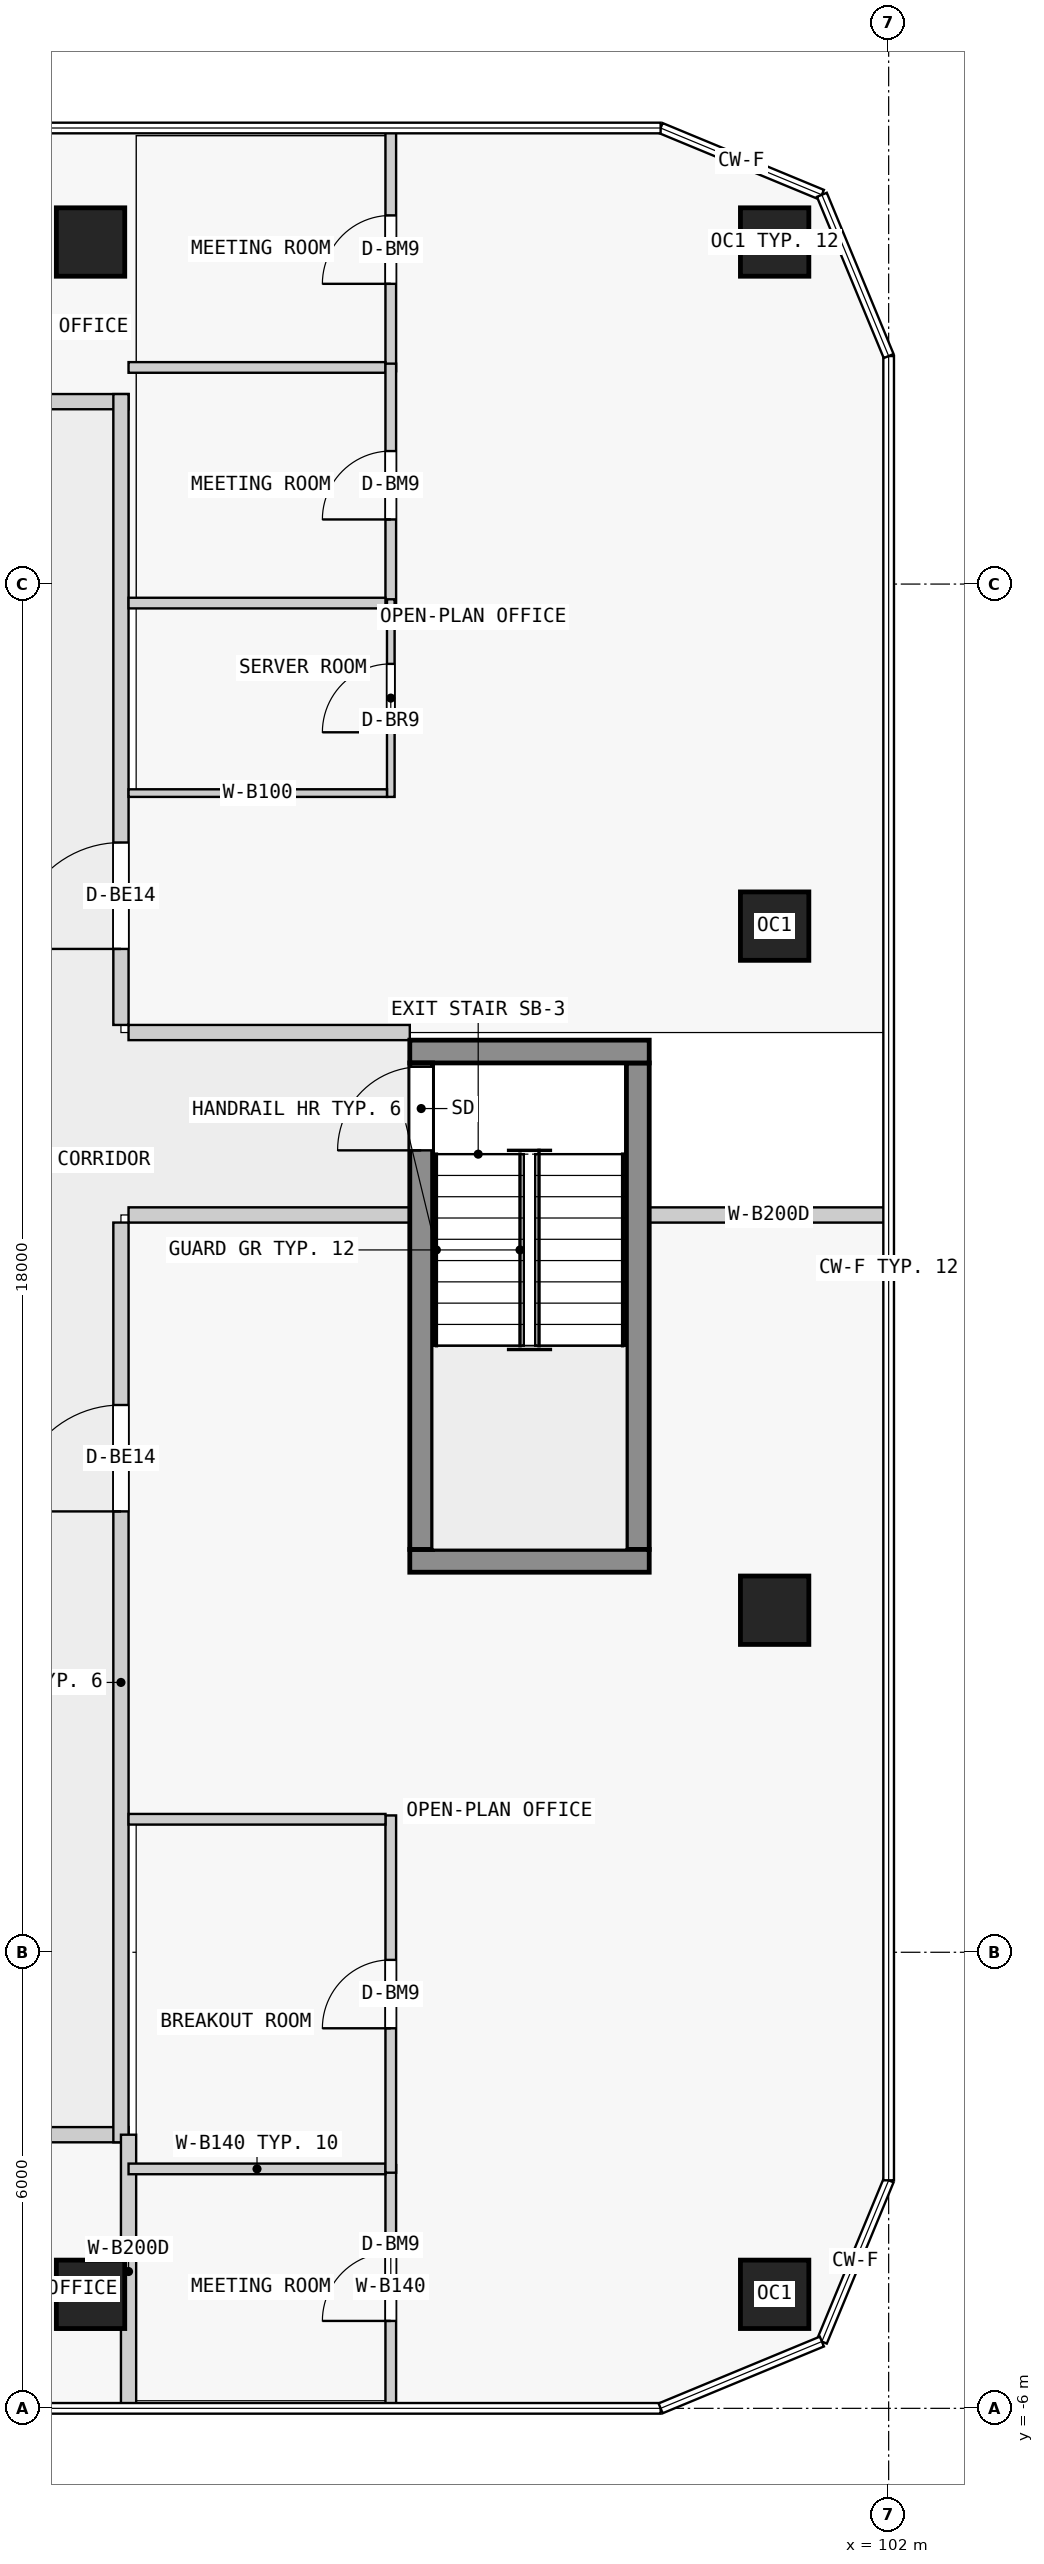
"""IFC4 building model, lengths in metres.
Left out: names, types, materials, properties, quantities, classifications, styles, units other than length and angle.
Written with IfcOpenShell. Run it as: python <this file> out.ifc"""

import sys

from ifc_helpers import new_model, si_unit, direction, frame, frame_2d, origin, origin_2d, place, context, subcontext, project, spatial, rectangle, extrude, element, fill, save


model = new_model("IFC4")
c1 = context("Model", 3, precision=1e-05, world=origin(), true_north=direction((0.0, 1.0)))
c2 = subcontext(c1, "Body", "Model", "MODEL_VIEW")
j1 = project(units=[si_unit("LENGTHUNIT", "METRE"), si_unit("PLANEANGLEUNIT", "RADIAN")], contexts=[c1])
p1 = place(None, origin())
s1 = spatial("IfcSite", under=j1, at=p1, CompositionType="ELEMENT")
p2 = place(p1, origin())
s2 = spatial("IfcBuilding", under=s1, at=p2, CompositionType="ELEMENT")
p3 = place(p2, frame((0.0, 0.0, 88.8)))
s3 = spatial("IfcBuildingStorey", under=s2, at=p3, CompositionType="ELEMENT", Elevation=88.8)
for number, where, z_axis, x_axis in (
    (1, (91.5, -4.5, 0.0), (0.0, 0.0, 1.0), (1.0, 0.0, 0.0)),
    (2, (100.5, -4.5, 0.0), (0.0, 0.0, 1.0), (1.0, 0.0, 0.0)),
    (3, (100.5, 4.5, 0.0), (0.0, 0.0, 1.0), (1.0, 0.0, 0.0)),
    (4, (100.5, 13.5, 0.0), (0.0, 0.0, 1.0), (1.0, 0.0, 0.0)),
    (5, (100.5, 22.5, 0.0), (0.0, 0.0, 1.0), (1.0, 0.0, 0.0)),
    (6, (91.5, 22.5, 0.0), (0.0, 0.0, 1.0), (1.0, 0.0, 0.0)),
):
    element("IfcColumn", number, at=place(p3, frame(where, z_axis=z_axis, x_axis=x_axis)), inside=s3, PredefinedType="COLUMN", context=c2, shape_type="SweptSolid", body=[
        extrude(rectangle(XDim=0.9, YDim=0.9, at=origin_2d()), origin(), (0.0, 0.0, 1.0), 3.5),
    ])
p4 = place(p3, frame((95.85, 5.3, 0.0), z_axis=(0.0, 0.0, 1.0), x_axis=(0.0, 1.0, 0.0)))
e7 = element("IfcWall", 7, at=p4, inside=s3, PredefinedType="SHEAR", context=c2, shape_type="SweptSolid", body=[
    extrude(rectangle(XDim=6.4, YDim=0.3, at=frame_2d((3.2, 0.0))), origin(), (0.0, 0.0, 1.0), 3.25),
])
p5 = place(p4, frame((5.25, 0.0, 0.0)))
e8 = element("IfcOpeningElement", 8, at=p5, cuts=e7, PredefinedType="OPENING", context=c2, shape_type="SweptSolid", body=[
    extrude(rectangle(XDim=1.1, YDim=2.1, at=frame_2d((0.55, 1.05))), frame((0.0, 0.16, 0.0), z_axis=(0.0, -1.0, 0.0), x_axis=(1.0, 0.0, 0.0)), (0.0, 0.0, 1.0), 0.32),
])
p6 = place(p3, frame((98.7, 5.3, 0.0), z_axis=(0.0, 0.0, 1.0), x_axis=(0.0, 1.0, 0.0)))
e9 = element("IfcWall", 9, at=p6, inside=s3, PredefinedType="SHEAR", context=c2, shape_type="SweptSolid", body=[
    extrude(rectangle(XDim=6.4, YDim=0.3, at=frame_2d((3.2, 0.0))), origin(), (0.0, 0.0, 1.0), 3.25),
])
for number, where, z_axis, x_axis in (
    (10, (95.7, 5.15, 0.0), (0.0, 0.0, 1.0), (1.0, 0.0, 0.0)),
    (11, (95.7, 11.85, 0.0), (0.0, 0.0, 1.0), (1.0, 0.0, 0.0)),
):
    element("IfcWall", number, at=place(p3, frame(where, z_axis=z_axis, x_axis=x_axis)), inside=s3, PredefinedType="SHEAR", context=c2, shape_type="SweptSolid", body=[
        extrude(rectangle(XDim=3.15, YDim=0.3, at=frame_2d((1.575, 0.0))), origin(), (0.0, 0.0, 1.0), 3.25),
    ])
p7 = place(p3, frame((72.0, -2.4, 0.0), z_axis=(0.0, 0.0, 1.0), x_axis=(1.0, 0.0, 0.0)))
e12 = element("IfcWall", 12, at=p7, inside=s3, PredefinedType="PARTITIONING", context=c2, shape_type="SweptSolid", body=[
    extrude(rectangle(XDim=20.0, YDim=0.2, at=frame_2d((10.0, 0.0))), origin(), (0.0, 0.0, 1.0), 3.25),
])
p8 = place(p7, frame((11.5, 0.0, 0.0)))
e13 = element("IfcOpeningElement", 13, at=p8, cuts=e12, PredefinedType="OPENING", context=c2, shape_type="SweptSolid", body=[
    extrude(rectangle(XDim=1.0, YDim=2.4, at=frame_2d((0.5, 1.2))), frame((0.0, 0.11, 0.0), z_axis=(0.0, -1.0, 0.0), x_axis=(1.0, 0.0, 0.0)), (0.0, 0.0, 1.0), 0.22),
])
p9 = place(p3, frame((72.0, 20.4, 0.0), z_axis=(0.0, 0.0, 1.0), x_axis=(1.0, 0.0, 0.0)))
e14 = element("IfcWall", 14, at=p9, inside=s3, PredefinedType="PARTITIONING", context=c2, shape_type="SweptSolid", body=[
    extrude(rectangle(XDim=20.0, YDim=0.2, at=frame_2d((10.0, 0.0))), origin(), (0.0, 0.0, 1.0), 3.25),
])
p10 = place(p3, frame((91.9, -2.5, 0.0), z_axis=(0.0, 0.0, 1.0), x_axis=(0.0, 1.0, 0.0)))
e15 = element("IfcWall", 15, at=p10, inside=s3, PredefinedType="PARTITIONING", context=c2, shape_type="SweptSolid", body=[
    extrude(rectangle(XDim=12.1, YDim=0.2, at=frame_2d((6.05, 0.0))), origin(), (0.0, 0.0, 1.0), 3.25),
])
p11 = place(p10, frame((8.3, 0.0, 0.0)))
e16 = element("IfcOpeningElement", 16, at=p11, cuts=e15, PredefinedType="OPENING", context=c2, shape_type="SweptSolid", body=[
    extrude(rectangle(XDim=1.4, YDim=2.4, at=frame_2d((0.7, 1.2))), frame((0.0, 0.11, 0.0), z_axis=(0.0, -1.0, 0.0), x_axis=(1.0, 0.0, 0.0)), (0.0, 0.0, 1.0), 0.22),
])
p12 = place(p3, frame((91.9, 12.2, 0.0), z_axis=(0.0, 0.0, 1.0), x_axis=(0.0, 1.0, 0.0)))
e17 = element("IfcWall", 17, at=p12, inside=s3, PredefinedType="PARTITIONING", context=c2, shape_type="SweptSolid", body=[
    extrude(rectangle(XDim=8.3, YDim=0.2, at=frame_2d((4.15, 0.0))), origin(), (0.0, 0.0, 1.0), 3.25),
])
p13 = place(p12, frame((1.0, 0.0, 0.0)))
e18 = element("IfcOpeningElement", 18, at=p13, cuts=e17, PredefinedType="OPENING", context=c2, shape_type="SweptSolid", body=[
    extrude(rectangle(XDim=1.4, YDim=2.4, at=frame_2d((0.7, 1.2))), frame((0.0, 0.11, 0.0), z_axis=(0.0, -1.0, 0.0), x_axis=(1.0, 0.0, 0.0)), (0.0, 0.0, 1.0), 0.22),
])
for number, where, z_axis, x_axis in (
    (19, (92.0, 9.7, 0.0), (0.0, 0.0, 1.0), (1.0, 0.0, 0.0)),
    (20, (92.0, 12.1, 0.0), (0.0, 0.0, 1.0), (1.0, 0.0, 0.0)),
):
    element("IfcWall", number, at=place(p3, frame(where, z_axis=z_axis, x_axis=x_axis)), inside=s3, PredefinedType="PARTITIONING", context=c2, shape_type="SweptSolid", body=[
        extrude(rectangle(XDim=3.7, YDim=0.2, at=frame_2d((1.85, 0.0))), origin(), (0.0, 0.0, 1.0), 3.25),
    ])
p14 = place(p3, frame((98.85, 9.7, 0.0), z_axis=(0.0, 0.0, 1.0), x_axis=(1.0, 0.0, 0.0)))
e21 = element("IfcWall", 21, at=p14, inside=s3, PredefinedType="PARTITIONING", context=c2, shape_type="SweptSolid", body=[
    extrude(rectangle(XDim=3.15, YDim=0.2, at=frame_2d((1.575, 0.0))), origin(), (0.0, 0.0, 1.0), 3.25),
])
p15 = place(p3, frame((92.0, -6.0, 0.0), z_axis=(0.0, 0.0, 1.0), x_axis=(0.0, 1.0, 0.0)))
e22 = element("IfcWall", 22, at=p15, inside=s3, PredefinedType="PARTITIONING", context=c2, shape_type="SweptSolid", body=[
    extrude(rectangle(XDim=3.6, YDim=0.2, at=frame_2d((1.8, 0.0))), origin(), (0.0, 0.0, 1.0), 3.25),
])
p16 = place(p3, frame((95.45, -6.0, 0.0), z_axis=(0.0, 0.0, 1.0), x_axis=(0.0, 1.0, 0.0)))
e23 = element("IfcWall", 23, at=p16, inside=s3, PredefinedType="PARTITIONING", context=c2, shape_type="SweptSolid", body=[
    extrude(rectangle(XDim=3.2, YDim=0.14, at=frame_2d((1.6, 0.0))), origin(), (0.0, 0.0, 1.0), 3.25),
])
p17 = place(p16, frame((1.15, 0.0, 0.0)))
e24 = element("IfcOpeningElement", 24, at=p17, cuts=e23, PredefinedType="OPENING", context=c2, shape_type="SweptSolid", body=[
    extrude(rectangle(XDim=0.9, YDim=2.4, at=frame_2d((0.45, 1.2))), frame((0.0, 0.08, 0.0), z_axis=(0.0, -1.0, 0.0), x_axis=(1.0, 0.0, 0.0)), (0.0, 0.0, 1.0), 0.16),
])
p18 = place(p3, frame((92.0, -2.85, 0.0), z_axis=(0.0, 0.0, 1.0), x_axis=(1.0, 0.0, 0.0)))
e25 = element("IfcWall", 25, at=p18, inside=s3, PredefinedType="PARTITIONING", context=c2, shape_type="SweptSolid", body=[
    extrude(rectangle(XDim=3.38, YDim=0.14, at=frame_2d((1.69, 0.0))), origin(), (0.0, 0.0, 1.0), 3.25),
])
p19 = place(p3, frame((95.45, -2.9, 0.0), z_axis=(0.0, 0.0, 1.0), x_axis=(0.0, 1.0, 0.0)))
e26 = element("IfcWall", 26, at=p19, inside=s3, PredefinedType="PARTITIONING", context=c2, shape_type="SweptSolid", body=[
    extrude(rectangle(XDim=4.7, YDim=0.14, at=frame_2d((2.35, 0.0))), origin(), (0.0, 0.0, 1.0), 3.25),
])
p20 = place(p19, frame((1.9, 0.0, 0.0)))
e27 = element("IfcOpeningElement", 27, at=p20, cuts=e26, PredefinedType="OPENING", context=c2, shape_type="SweptSolid", body=[
    extrude(rectangle(XDim=0.9, YDim=2.4, at=frame_2d((0.45, 1.2))), frame((0.0, 0.08, 0.0), z_axis=(0.0, -1.0, 0.0), x_axis=(1.0, 0.0, 0.0)), (0.0, 0.0, 1.0), 0.16),
])
p21 = place(p3, frame((92.0, 1.75, 0.0), z_axis=(0.0, 0.0, 1.0), x_axis=(1.0, 0.0, 0.0)))
e28 = element("IfcWall", 28, at=p21, inside=s3, PredefinedType="PARTITIONING", context=c2, shape_type="SweptSolid", body=[
    extrude(rectangle(XDim=3.38, YDim=0.14, at=frame_2d((1.69, 0.0))), origin(), (0.0, 0.0, 1.0), 3.25),
])
p22 = place(p3, frame((95.45, 20.8, 0.0), z_axis=(0.0, 0.0, 1.0), x_axis=(0.0, 1.0, 0.0)))
e29 = element("IfcWall", 29, at=p22, inside=s3, PredefinedType="PARTITIONING", context=c2, shape_type="SweptSolid", body=[
    extrude(rectangle(XDim=3.2, YDim=0.14, at=frame_2d((1.6, 0.0))), origin(), (0.0, 0.0, 1.0), 3.25),
])
p23 = place(p22, frame((1.15, 0.0, 0.0)))
e30 = element("IfcOpeningElement", 30, at=p23, cuts=e29, PredefinedType="OPENING", context=c2, shape_type="SweptSolid", body=[
    extrude(rectangle(XDim=0.9, YDim=2.4, at=frame_2d((0.45, 1.2))), frame((0.0, 0.08, 0.0), z_axis=(0.0, -1.0, 0.0), x_axis=(1.0, 0.0, 0.0)), (0.0, 0.0, 1.0), 0.16),
])
p24 = place(p3, frame((92.0, 20.85, 0.0), z_axis=(0.0, 0.0, 1.0), x_axis=(1.0, 0.0, 0.0)))
e31 = element("IfcWall", 31, at=p24, inside=s3, PredefinedType="PARTITIONING", context=c2, shape_type="SweptSolid", body=[
    extrude(rectangle(XDim=3.38, YDim=0.14, at=frame_2d((1.69, 0.0))), origin(), (0.0, 0.0, 1.0), 3.25),
])
p25 = place(p3, frame((95.45, 17.7, 0.0), z_axis=(0.0, 0.0, 1.0), x_axis=(0.0, 1.0, 0.0)))
e32 = element("IfcWall", 32, at=p25, inside=s3, PredefinedType="PARTITIONING", context=c2, shape_type="SweptSolid", body=[
    extrude(rectangle(XDim=3.2, YDim=0.14, at=frame_2d((1.6, 0.0))), origin(), (0.0, 0.0, 1.0), 3.25),
])
p26 = place(p25, frame((1.15, 0.0, 0.0)))
e33 = element("IfcOpeningElement", 33, at=p26, cuts=e32, PredefinedType="OPENING", context=c2, shape_type="SweptSolid", body=[
    extrude(rectangle(XDim=0.9, YDim=2.4, at=frame_2d((0.45, 1.2))), frame((0.0, 0.08, 0.0), z_axis=(0.0, -1.0, 0.0), x_axis=(1.0, 0.0, 0.0)), (0.0, 0.0, 1.0), 0.16),
])
p27 = place(p3, frame((92.0, 17.75, 0.0), z_axis=(0.0, 0.0, 1.0), x_axis=(1.0, 0.0, 0.0)))
e34 = element("IfcWall", 34, at=p27, inside=s3, PredefinedType="PARTITIONING", context=c2, shape_type="SweptSolid", body=[
    extrude(rectangle(XDim=3.38, YDim=0.14, at=frame_2d((1.69, 0.0))), origin(), (0.0, 0.0, 1.0), 3.25),
])
p28 = place(p3, frame((95.45, 15.2, 0.0), z_axis=(0.0, 0.0, 1.0), x_axis=(0.0, 1.0, 0.0)))
e35 = element("IfcWall", 35, at=p28, inside=s3, PredefinedType="PARTITIONING", context=c2, shape_type="SweptSolid", body=[
    extrude(rectangle(XDim=2.6, YDim=0.1, at=frame_2d((1.3, 0.0))), origin(), (0.0, 0.0, 1.0), 3.25),
])
p29 = place(p28, frame((0.85, 0.0, 0.0)))
e36 = element("IfcOpeningElement", 36, at=p29, cuts=e35, PredefinedType="OPENING", context=c2, shape_type="SweptSolid", body=[
    extrude(rectangle(XDim=0.9, YDim=2.1, at=frame_2d((0.45, 1.05))), frame((0.0, 0.06, 0.0), z_axis=(0.0, -1.0, 0.0), x_axis=(1.0, 0.0, 0.0)), (0.0, 0.0, 1.0), 0.12),
])
p30 = place(p3, frame((92.0, 15.25, 0.0), z_axis=(0.0, 0.0, 1.0), x_axis=(1.0, 0.0, 0.0)))
e37 = element("IfcWall", 37, at=p30, inside=s3, PredefinedType="PARTITIONING", context=c2, shape_type="SweptSolid", body=[
    extrude(rectangle(XDim=3.4, YDim=0.1, at=frame_2d((1.7, 0.0))), origin(), (0.0, 0.0, 1.0), 3.25),
])
p31 = place(p5, origin())
e38 = element("IfcDoor", 38, at=p31, inside=s3, OperationType="SINGLE_SWING_LEFT", PredefinedType="DOOR", context=c2, shape_type="SweptSolid", body=[
    extrude(rectangle(XDim=1.1, YDim=2.1, at=frame_2d((0.55, 1.05))), frame((0.0, 0.025, 0.0), z_axis=(0.0, -1.0, 0.0), x_axis=(1.0, 0.0, 0.0)), (0.0, 0.0, 1.0), 0.05),
])
fill(e8, e38)
p32 = place(p11, origin())
e39 = element("IfcDoor", 39, at=p32, inside=s3, OperationType="DOUBLE_DOOR_SINGLE_SWING", PredefinedType="DOOR", context=c2, shape_type="SweptSolid", body=[
    extrude(rectangle(XDim=1.4, YDim=2.4, at=frame_2d((0.7, 1.2))), frame((0.0, 0.025, 0.0), z_axis=(0.0, -1.0, 0.0), x_axis=(1.0, 0.0, 0.0)), (0.0, 0.0, 1.0), 0.05),
])
fill(e16, e39)
p33 = place(p13, origin())
e40 = element("IfcDoor", 40, at=p33, inside=s3, OperationType="DOUBLE_DOOR_SINGLE_SWING", PredefinedType="DOOR", context=c2, shape_type="SweptSolid", body=[
    extrude(rectangle(XDim=1.4, YDim=2.4, at=frame_2d((0.7, 1.2))), frame((0.0, 0.025, 0.0), z_axis=(0.0, -1.0, 0.0), x_axis=(1.0, 0.0, 0.0)), (0.0, 0.0, 1.0), 0.05),
])
fill(e18, e40)
p34 = place(p17, origin())
e41 = element("IfcDoor", 41, at=p34, inside=s3, OperationType="SINGLE_SWING_LEFT", PredefinedType="DOOR", context=c2, shape_type="SweptSolid", body=[
    extrude(rectangle(XDim=0.9, YDim=2.4, at=frame_2d((0.45, 1.2))), frame((0.0, 0.025, 0.0), z_axis=(0.0, -1.0, 0.0), x_axis=(1.0, 0.0, 0.0)), (0.0, 0.0, 1.0), 0.05),
])
fill(e24, e41)
p35 = place(p20, origin())
e42 = element("IfcDoor", 42, at=p35, inside=s3, OperationType="SINGLE_SWING_LEFT", PredefinedType="DOOR", context=c2, shape_type="SweptSolid", body=[
    extrude(rectangle(XDim=0.9, YDim=2.4, at=frame_2d((0.45, 1.2))), frame((0.0, 0.025, 0.0), z_axis=(0.0, -1.0, 0.0), x_axis=(1.0, 0.0, 0.0)), (0.0, 0.0, 1.0), 0.05),
])
fill(e27, e42)
p36 = place(p23, origin())
e43 = element("IfcDoor", 43, at=p36, inside=s3, OperationType="SINGLE_SWING_LEFT", PredefinedType="DOOR", context=c2, shape_type="SweptSolid", body=[
    extrude(rectangle(XDim=0.9, YDim=2.4, at=frame_2d((0.45, 1.2))), frame((0.0, 0.025, 0.0), z_axis=(0.0, -1.0, 0.0), x_axis=(1.0, 0.0, 0.0)), (0.0, 0.0, 1.0), 0.05),
])
fill(e30, e43)
p37 = place(p26, origin())
e44 = element("IfcDoor", 44, at=p37, inside=s3, OperationType="SINGLE_SWING_LEFT", PredefinedType="DOOR", context=c2, shape_type="SweptSolid", body=[
    extrude(rectangle(XDim=0.9, YDim=2.4, at=frame_2d((0.45, 1.2))), frame((0.0, 0.025, 0.0), z_axis=(0.0, -1.0, 0.0), x_axis=(1.0, 0.0, 0.0)), (0.0, 0.0, 1.0), 0.05),
])
fill(e33, e44)
p38 = place(p29, origin())
e45 = element("IfcDoor", 45, at=p38, inside=s3, OperationType="SINGLE_SWING_LEFT", PredefinedType="DOOR", context=c2, shape_type="SweptSolid", body=[
    extrude(rectangle(XDim=0.9, YDim=2.1, at=frame_2d((0.45, 1.05))), frame((0.0, 0.025, 0.0), z_axis=(0.0, -1.0, 0.0), x_axis=(1.0, 0.0, 0.0)), (0.0, 0.0, 1.0), 0.05),
])
fill(e36, e45)
save(model, sys.argv[1])
